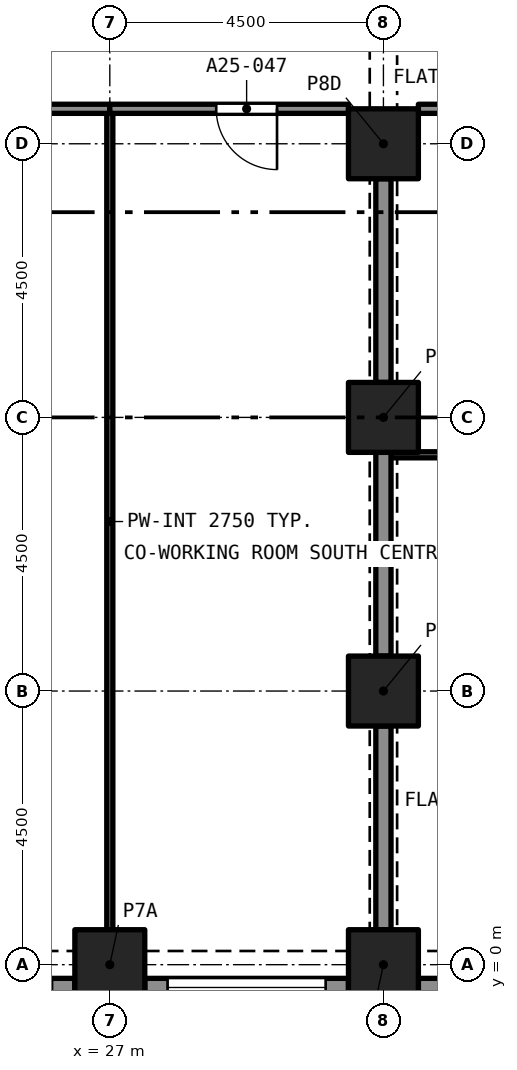
"""IFC4 building model, lengths in metres.
Left out: names, types, materials, properties, quantities, classifications, styles, units other than length and angle.
Written with IfcOpenShell. Run it as: python <this file> out.ifc"""

import sys

from ifc_helpers import new_model, si_unit, direction, frame, frame_2d, origin, origin_2d, place, context, subcontext, project, spatial, rectangle, extrude, element, fill, save


model = new_model("IFC4")
c1 = context("Model", 3, precision=1e-05, world=origin(), true_north=direction((0.0, 1.0)))
c2 = subcontext(c1, "Body", "Model", "MODEL_VIEW")
j1 = project(units=[si_unit("LENGTHUNIT", "METRE"), si_unit("PLANEANGLEUNIT", "RADIAN")], contexts=[c1])
p1 = place(None, origin())
s1 = spatial("IfcSite", under=j1, at=p1, CompositionType="ELEMENT")
p2 = place(p1, origin())
s2 = spatial("IfcBuilding", under=s1, at=p2, CompositionType="ELEMENT")
p3 = place(p2, frame((0.0, 0.0, 92.8)))
s3 = spatial("IfcBuildingStorey", under=s2, at=p3, CompositionType="ELEMENT", Elevation=92.8)
for number, where, z_axis, x_axis in (
    (1, (27.0, 0.0, 0.0), (0.0, 0.0, 1.0), (1.0, 0.0, 0.0)),
    (2, (31.5, 0.0, 0.0), (0.0, 0.0, 1.0), (1.0, 0.0, 0.0)),
    (3, (31.5, 4.5, 0.0), (0.0, 0.0, 1.0), (1.0, 0.0, 0.0)),
    (4, (31.5, 9.0, 0.0), (0.0, 0.0, 1.0), (1.0, 0.0, 0.0)),
    (5, (31.5, 13.5, 0.0), (0.0, 0.0, 1.0), (1.0, 0.0, 0.0)),
):
    element("IfcColumn", number, at=place(p3, frame(where, z_axis=z_axis, x_axis=x_axis)), inside=s3, PredefinedType="COLUMN", context=c2, shape_type="SweptSolid", body=[
        extrude(rectangle(XDim=1.15, YDim=1.15, at=origin_2d()), origin(), (0.0, 0.0, 1.0), 3.2),
    ])
p4 = place(p3, frame((26.425, -0.375, 0.0), z_axis=(0.0, 0.0, 1.0), x_axis=(-1.0, 0.0, 0.0)))
e6 = element("IfcWall", 6, at=p4, inside=s3, PredefinedType="SOLIDWALL", context=c2, shape_type="SweptSolid", body=[
    extrude(rectangle(XDim=3.35, YDim=0.3, at=frame_2d((1.675, 0.0))), origin(), (0.0, 0.0, 1.0), 3.2),
])
p5 = place(p4, frame((0.375, 0.0, 0.45)))
e7 = element("IfcOpeningElement", 7, at=p5, cuts=e6, PredefinedType="OPENING", context=c2, shape_type="SweptSolid", body=[
    extrude(rectangle(XDim=2.6, YDim=1.95, at=frame_2d((1.3, 0.975))), frame((0.0, 0.16, 0.0), z_axis=(0.0, -1.0, 0.0), x_axis=(1.0, 0.0, 0.0)), (0.0, 0.0, 1.0), 0.32),
])
p6 = place(p3, frame((30.925, -0.375, 0.0), z_axis=(0.0, 0.0, 1.0), x_axis=(-1.0, 0.0, 0.0)))
e8 = element("IfcWall", 8, at=p6, inside=s3, PredefinedType="SOLIDWALL", context=c2, shape_type="SweptSolid", body=[
    extrude(rectangle(XDim=3.35, YDim=0.3, at=frame_2d((1.675, 0.0))), origin(), (0.0, 0.0, 1.0), 3.2),
])
p7 = place(p6, frame((0.375, 0.0, 0.45)))
e9 = element("IfcOpeningElement", 9, at=p7, cuts=e8, PredefinedType="OPENING", context=c2, shape_type="SweptSolid", body=[
    extrude(rectangle(XDim=2.6, YDim=1.95, at=frame_2d((1.3, 0.975))), frame((0.0, 0.16, 0.0), z_axis=(0.0, -1.0, 0.0), x_axis=(1.0, 0.0, 0.0)), (0.0, 0.0, 1.0), 0.32),
])
p8 = place(p3, frame((35.425, -0.375, 0.0), z_axis=(0.0, 0.0, 1.0), x_axis=(-1.0, 0.0, 0.0)))
e10 = element("IfcWall", 10, at=p8, inside=s3, PredefinedType="SOLIDWALL", context=c2, shape_type="SweptSolid", body=[
    extrude(rectangle(XDim=3.35, YDim=0.3, at=frame_2d((1.675, 0.0))), origin(), (0.0, 0.0, 1.0), 3.2),
])
p9 = place(p8, frame((0.375, 0.0, 0.45)))
e11 = element("IfcOpeningElement", 11, at=p9, cuts=e10, PredefinedType="OPENING", context=c2, shape_type="SweptSolid", body=[
    extrude(rectangle(XDim=2.6, YDim=1.95, at=frame_2d((1.3, 0.975))), frame((0.0, 0.16, 0.0), z_axis=(0.0, -1.0, 0.0), x_axis=(1.0, 0.0, 0.0)), (0.0, 0.0, 1.0), 0.32),
])
p10 = place(p3, frame((36.0, 8.385, 0.0), z_axis=(0.0, 0.0, 1.0), x_axis=(-1.0, 0.0, 0.0)))
e12 = element("IfcWall", 12, at=p10, inside=s3, PredefinedType="PARTITIONING", context=c2, shape_type="SweptSolid", body=[
    extrude(rectangle(XDim=4.375, YDim=0.1, at=frame_2d((2.188, 0.0))), origin(), (0.0, 0.0, 1.0), 2.9),
])
p11 = place(p10, frame((1.75, 0.0, 0.0)))
e13 = element("IfcOpeningElement", 13, at=p11, cuts=e12, PredefinedType="OPENING", context=c2, shape_type="SweptSolid", body=[
    extrude(rectangle(XDim=1.0, YDim=2.1, at=frame_2d((0.5, 1.05))), frame((0.0, 0.06, 0.0), z_axis=(0.0, -1.0, 0.0), x_axis=(1.0, 0.0, 0.0)), (0.0, 0.0, 1.0), 0.12),
])
p12 = place(p3, frame((31.5, 9.575, 0.0), z_axis=(0.0, 0.0, 1.0), x_axis=(0.0, 1.0, 0.0)))
e14 = element("IfcWall", 14, at=p12, inside=s3, PredefinedType="PARTITIONING", context=c2, shape_type="SweptSolid", body=[
    extrude(rectangle(XDim=3.35, YDim=0.25, at=frame_2d((1.675, 0.0))), origin(), (0.0, 0.0, 1.0), 2.38),
])
p13 = place(p3, frame((34.425, 14.075, 0.0), z_axis=(0.0, 0.0, 1.0), x_axis=(-1.0, 0.0, 0.0)))
e15 = element("IfcWall", 15, at=p13, inside=s3, PredefinedType="PARTITIONING", context=c2, shape_type="SweptSolid", body=[
    extrude(rectangle(XDim=2.35, YDim=0.15, at=frame_2d((1.175, 0.0))), origin(), (0.0, 0.0, 1.0), 2.9),
])
p14 = place(p13, frame((0.175, 0.0, 0.0)))
e16 = element("IfcOpeningElement", 16, at=p14, cuts=e15, PredefinedType="OPENING", context=c2, shape_type="SweptSolid", body=[
    extrude(rectangle(XDim=1.0, YDim=2.1, at=frame_2d((0.5, 1.05))), frame((0.0, 0.085, 0.0), z_axis=(0.0, -1.0, 0.0), x_axis=(1.0, 0.0, 0.0)), (0.0, 0.0, 1.0), 0.17),
])
p15 = place(p3, frame((31.5, 0.575, 0.0), z_axis=(0.0, 0.0, 1.0), x_axis=(0.0, 1.0, 0.0)))
e17 = element("IfcWall", 17, at=p15, inside=s3, PredefinedType="PARTITIONING", context=c2, shape_type="SweptSolid", body=[
    extrude(rectangle(XDim=3.35, YDim=0.25, at=frame_2d((1.675, 0.0))), origin(), (0.0, 0.0, 1.0), 2.38),
])
p16 = place(p3, frame((31.5, 5.075, 0.0), z_axis=(0.0, 0.0, 1.0), x_axis=(0.0, 1.0, 0.0)))
e18 = element("IfcWall", 18, at=p16, inside=s3, PredefinedType="PARTITIONING", context=c2, shape_type="SweptSolid", body=[
    extrude(rectangle(XDim=3.36, YDim=0.25, at=frame_2d((1.68, 0.0))), origin(), (0.0, 0.0, 1.0), 2.38),
])
p17 = place(p3, frame((27.0, 0.575, 0.0), z_axis=(0.0, 0.0, 1.0), x_axis=(0.0, 1.0, 0.0)))
e19 = element("IfcWall", 19, at=p17, inside=s3, PredefinedType="PARTITIONING", context=c2, shape_type="SweptSolid", body=[
    extrude(rectangle(XDim=13.425, YDim=0.1, at=frame_2d((6.712, 0.0))), origin(), (0.0, 0.0, 1.0), 2.75),
])
p18 = place(p3, frame((27.0, 14.075, 0.0), z_axis=(0.0, 0.0, 1.0), x_axis=(-1.0, 0.0, 0.0)))
e20 = element("IfcWall", 20, at=p18, inside=s3, PredefinedType="PARTITIONING", context=c2, shape_type="SweptSolid", body=[
    extrude(rectangle(XDim=8.425, YDim=0.15, at=frame_2d((4.212, 0.0))), origin(), (0.0, 0.0, 1.0), 2.75),
])
p19 = place(p18, frame((4.0, 0.0, 0.0)))
e21 = element("IfcOpeningElement", 21, at=p19, cuts=e20, PredefinedType="OPENING", context=c2, shape_type="SweptSolid", body=[
    extrude(rectangle(XDim=1.0, YDim=2.1, at=frame_2d((0.5, 1.05))), frame((0.0, 0.085, 0.0), z_axis=(0.0, -1.0, 0.0), x_axis=(1.0, 0.0, 0.0)), (0.0, 0.0, 1.0), 0.17),
])
p20 = place(p3, frame((30.925, 14.075, 0.0), z_axis=(0.0, 0.0, 1.0), x_axis=(-1.0, 0.0, 0.0)))
e22 = element("IfcWall", 22, at=p20, inside=s3, PredefinedType="PARTITIONING", context=c2, shape_type="SweptSolid", body=[
    extrude(rectangle(XDim=3.925, YDim=0.15, at=frame_2d((1.962, 0.0))), origin(), (0.0, 0.0, 1.0), 2.75),
])
p21 = place(p20, frame((1.175, 0.0, 0.0)))
e23 = element("IfcOpeningElement", 23, at=p21, cuts=e22, PredefinedType="OPENING", context=c2, shape_type="SweptSolid", body=[
    extrude(rectangle(XDim=1.0, YDim=2.1, at=frame_2d((0.5, 1.05))), frame((0.0, 0.085, 0.0), z_axis=(0.0, -1.0, 0.0), x_axis=(1.0, 0.0, 0.0)), (0.0, 0.0, 1.0), 0.17),
])
p22 = place(p7, origin())
e24 = element("IfcWindow", 24, at=p22, inside=s3, PartitioningType="SINGLE_PANEL", PredefinedType="WINDOW", context=c2, shape_type="SweptSolid", body=[
    extrude(rectangle(XDim=2.6, YDim=1.95, at=frame_2d((1.3, 0.975))), frame((0.0, 0.03, 0.0), z_axis=(0.0, -1.0, 0.0), x_axis=(1.0, 0.0, 0.0)), (0.0, 0.0, 1.0), 0.06),
])
fill(e9, e24)
p23 = place(p21, origin())
e25 = element("IfcDoor", 25, at=p23, inside=s3, OperationType="SINGLE_SWING_LEFT", PredefinedType="DOOR", context=c2, shape_type="SweptSolid", body=[
    extrude(rectangle(XDim=1.0, YDim=2.1, at=frame_2d((0.5, 1.05))), frame((0.0, 0.025, 0.0), z_axis=(0.0, -1.0, 0.0), x_axis=(1.0, 0.0, 0.0)), (0.0, 0.0, 1.0), 0.05),
])
fill(e23, e25)
save(model, sys.argv[1])
